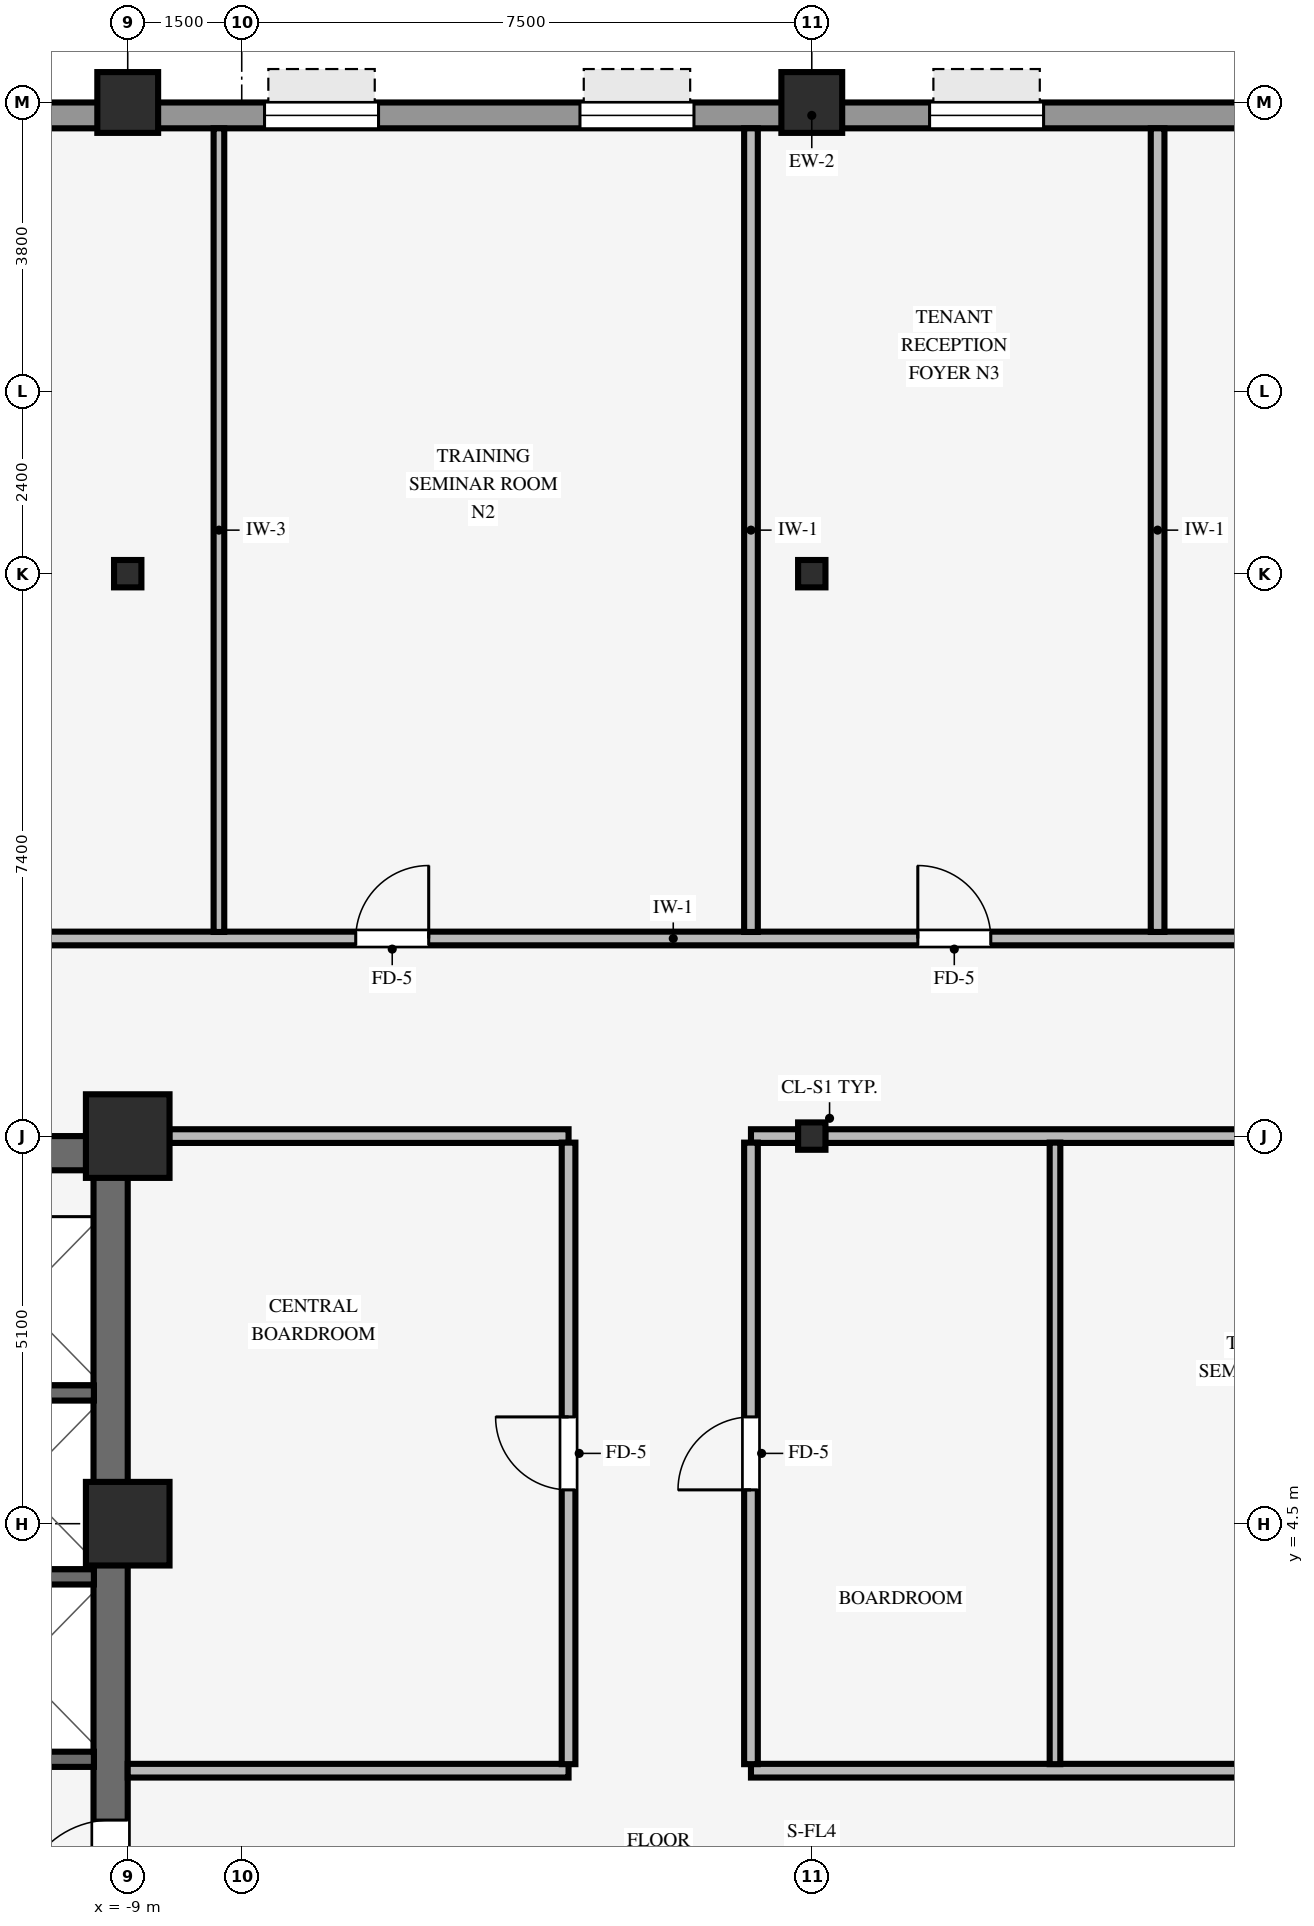
"""IFC4 building model, lengths in metres.
Left out: names, types, materials, properties, quantities, classifications, styles, units other than length and angle.
Written with IfcOpenShell. Run it as: python <this file> out.ifc"""

import sys

from ifc_helpers import new_model, si_unit, direction, frame, frame_2d, origin, origin_2d, place, context, subcontext, project, spatial, rectangle, hollow_rectangle, i_section, extrude, source, transform, mapped, element, fill, save


model = new_model("IFC4")
c1 = context("Model", 3, precision=1e-05, world=origin(), true_north=direction((0.0, 1.0)))
c2 = subcontext(c1, "Body", "Model", "MODEL_VIEW")
j1 = project(units=[si_unit("LENGTHUNIT", "METRE"), si_unit("PLANEANGLEUNIT", "RADIAN")], contexts=[c1])
p1 = place(None, origin())
s1 = spatial("IfcSite", under=j1, at=p1, CompositionType="ELEMENT")
p2 = place(p1, origin())
s2 = spatial("IfcBuilding", under=s1, at=p2, CompositionType="ELEMENT")
p3 = place(p2, frame((0.0, 0.0, 82.35)))
s3 = spatial("IfcBuildingStorey", under=s2, at=p3, CompositionType="ELEMENT", Elevation=82.35)
p4 = place(p3, frame((-17.5, 9.375, 0.0), z_axis=(0.0, 0.0, 1.0), x_axis=(1.0, 0.0, 0.0)))
e1 = element("IfcWall", 1, at=p4, inside=s3, PredefinedType="SHEAR", context=c2, shape_type="SweptSolid", body=[
    extrude(rectangle(XDim=8.5, YDim=0.45, at=frame_2d((4.25, 0.0))), origin(), (0.0, 0.0, 1.0), 3.25),
])
p5 = place(p3, frame((-9.225, -9.155, 0.0), z_axis=(0.0, 0.0, 1.0), x_axis=(0.0, 1.0, 0.0)))
e2 = element("IfcWall", 2, at=p5, inside=s3, PredefinedType="SHEAR", context=c2, shape_type="SweptSolid", body=[
    extrude(rectangle(XDim=18.31, YDim=0.45, at=frame_2d((9.155, 0.0))), origin(), (0.0, 0.0, 1.0), 3.25),
])
p6 = place(p5, frame((8.555, 0.0, 0.0)))
e3 = element("IfcOpeningElement", 3, at=p6, cuts=e2, PredefinedType="OPENING", context=c2, shape_type="SweptSolid", body=[
    extrude(rectangle(XDim=1.2, YDim=2.15, at=frame_2d((0.6, 1.075))), frame((0.0, 0.235, 0.0), z_axis=(0.0, -1.0, 0.0), x_axis=(1.0, 0.0, 0.0)), (0.0, 0.0, 1.0), 0.47),
])
for number, where, z_axis, x_axis in (
    (4, (-9.0, 4.5, 0.0), (0.0, 0.0, 1.0), (1.0, 0.0, 0.0)),
    (5, (-9.0, 9.6, 0.0), (0.0, 0.0, 1.0), (1.0, 0.0, 0.0)),
):
    element("IfcColumn", number, at=place(p3, frame(where, z_axis=z_axis, x_axis=x_axis)), inside=s3, PredefinedType="COLUMN", context=c2, shape_type="SweptSolid", body=[
        extrude(rectangle(XDim=1.1, YDim=1.1, at=origin_2d()), origin(), (0.0, 0.0, 1.0), 3.25),
    ])
for number, where, z_axis, x_axis in (
    (6, (-9.0, 23.2, 0.0), (0.0, 0.0, 1.0), (1.0, 0.0, 0.0)),
    (7, (0.0, 23.2, 0.0), (0.0, 0.0, 1.0), (1.0, 0.0, 0.0)),
):
    element("IfcColumn", number, at=place(p3, frame(where, z_axis=z_axis, x_axis=x_axis)), inside=s3, PredefinedType="COLUMN", context=c2, shape_type="SweptSolid", body=[
        extrude(hollow_rectangle(XDim=0.8, YDim=0.8, WallThickness=0.055, InnerFilletRadius=0.055, OuterFilletRadius=0.11, at=origin_2d()), origin(), (0.0, 0.0, 1.0), 3.25),
    ])
for number, where, z_axis, x_axis in (
    (8, (0.0, 9.6, 0.0), (0.0, 0.0, 1.0), (1.0, 0.0, 0.0)),
    (9, (0.0, 17.0, 0.0), (0.0, 0.0, 1.0), (1.0, 0.0, 0.0)),
    (10, (-9.0, 17.0, 0.0), (0.0, 0.0, 1.0), (1.0, 0.0, 0.0)),
):
    element("IfcColumn", number, at=place(p3, frame(where, z_axis=z_axis, x_axis=x_axis)), inside=s3, PredefinedType="COLUMN", context=c2, shape_type="SweptSolid", body=[
        extrude(i_section(OverallWidth=0.36, OverallDepth=0.36, WebThickness=0.021, FlangeThickness=0.021, FilletRadius=0.018, at=origin_2d()), origin(), (0.0, 0.0, 1.0), 3.25),
    ])
p7 = place(p3, frame((-19.4, 23.03, 0.0), z_axis=(0.0, 0.0, 1.0), x_axis=(1.0, 0.0, 0.0)))
e11 = element("IfcWall", 11, at=p7, inside=s3, PredefinedType="STANDARD", context=c2, shape_type="SweptSolid", body=[
    extrude(rectangle(XDim=38.8, YDim=0.34, at=frame_2d((19.4, 0.0))), origin(), (0.0, 0.0, 1.0), 2.585),
])
p8 = place(p7, frame((2.55, 0.0, 0.8)))
e12 = element("IfcOpeningElement", 12, at=p8, cuts=e11, PredefinedType="OPENING", context=c2, shape_type="SweptSolid", body=[
    extrude(rectangle(XDim=1.5, YDim=1.6, at=frame_2d((0.75, 0.8))), frame((0.0, 0.18, 0.0), z_axis=(0.0, -1.0, 0.0), x_axis=(1.0, 0.0, 0.0)), (0.0, 0.0, 1.0), 0.36),
])
p9 = place(p7, frame((7.15, 0.0, 0.8)))
e13 = element("IfcOpeningElement", 13, at=p9, cuts=e11, PredefinedType="OPENING", context=c2, shape_type="SweptSolid", body=[
    extrude(rectangle(XDim=1.5, YDim=1.6, at=frame_2d((0.75, 0.8))), frame((0.0, 0.18, 0.0), z_axis=(0.0, -1.0, 0.0), x_axis=(1.0, 0.0, 0.0)), (0.0, 0.0, 1.0), 0.36),
])
p10 = place(p7, frame((12.2, 0.0, 0.8)))
e14 = element("IfcOpeningElement", 14, at=p10, cuts=e11, PredefinedType="OPENING", context=c2, shape_type="SweptSolid", body=[
    extrude(rectangle(XDim=1.5, YDim=1.6, at=frame_2d((0.75, 0.8))), frame((0.0, 0.18, 0.0), z_axis=(0.0, -1.0, 0.0), x_axis=(1.0, 0.0, 0.0)), (0.0, 0.0, 1.0), 0.36),
])
p11 = place(p7, frame((16.35, 0.0, 0.8)))
e15 = element("IfcOpeningElement", 15, at=p11, cuts=e11, PredefinedType="OPENING", context=c2, shape_type="SweptSolid", body=[
    extrude(rectangle(XDim=1.5, YDim=1.6, at=frame_2d((0.75, 0.8))), frame((0.0, 0.18, 0.0), z_axis=(0.0, -1.0, 0.0), x_axis=(1.0, 0.0, 0.0)), (0.0, 0.0, 1.0), 0.36),
])
p12 = place(p7, frame((20.95, 0.0, 0.8)))
e16 = element("IfcOpeningElement", 16, at=p12, cuts=e11, PredefinedType="OPENING", context=c2, shape_type="SweptSolid", body=[
    extrude(rectangle(XDim=1.5, YDim=1.6, at=frame_2d((0.75, 0.8))), frame((0.0, 0.18, 0.0), z_axis=(0.0, -1.0, 0.0), x_axis=(1.0, 0.0, 0.0)), (0.0, 0.0, 1.0), 0.36),
])
p13 = place(p7, frame((25.55, 0.0, 0.8)))
e17 = element("IfcOpeningElement", 17, at=p13, cuts=e11, PredefinedType="OPENING", context=c2, shape_type="SweptSolid", body=[
    extrude(rectangle(XDim=1.5, YDim=1.6, at=frame_2d((0.75, 0.8))), frame((0.0, 0.18, 0.0), z_axis=(0.0, -1.0, 0.0), x_axis=(1.0, 0.0, 0.0)), (0.0, 0.0, 1.0), 0.36),
])
p14 = place(p7, frame((30.15, 0.0, 0.8)))
e18 = element("IfcOpeningElement", 18, at=p14, cuts=e11, PredefinedType="OPENING", context=c2, shape_type="SweptSolid", body=[
    extrude(rectangle(XDim=1.5, YDim=1.6, at=frame_2d((0.75, 0.8))), frame((0.0, 0.18, 0.0), z_axis=(0.0, -1.0, 0.0), x_axis=(1.0, 0.0, 0.0)), (0.0, 0.0, 1.0), 0.36),
])
p15 = place(p7, frame((34.75, 0.0, 0.8)))
e19 = element("IfcOpeningElement", 19, at=p15, cuts=e11, PredefinedType="OPENING", context=c2, shape_type="SweptSolid", body=[
    extrude(rectangle(XDim=1.5, YDim=1.6, at=frame_2d((0.75, 0.8))), frame((0.0, 0.18, 0.0), z_axis=(0.0, -1.0, 0.0), x_axis=(1.0, 0.0, 0.0)), (0.0, 0.0, 1.0), 0.36),
])
for number, where, z_axis, x_axis in (
    (20, (-11.505, 1.4, 0.0), (0.0, 0.0, 1.0), (1.0, 0.0, 0.0)),
    (21, (-11.505, 3.8, 0.0), (0.0, 0.0, 1.0), (1.0, 0.0, 0.0)),
    (22, (-11.505, 6.22, 0.0), (0.0, 0.0, 1.0), (1.0, 0.0, 0.0)),
):
    element("IfcWall", number, at=place(p3, frame(where, z_axis=z_axis, x_axis=x_axis)), inside=s3, PredefinedType="SHEAR", context=c2, shape_type="SweptSolid", body=[
        extrude(rectangle(XDim=2.06, YDim=0.2, at=frame_2d((1.03, 0.0))), origin(), (0.0, 0.0, 1.0), 3.25),
    ])
p16 = place(p3, frame((-9.0, 1.25, 0.0), z_axis=(0.0, 0.0, 1.0), x_axis=(1.0, 0.0, 0.0)))
e23 = element("IfcWall", 23, at=p16, inside=s3, PredefinedType="PARTITIONING", context=c2, shape_type="SweptSolid", body=[
    extrude(rectangle(XDim=5.8, YDim=0.18, at=frame_2d((2.9, 0.0))), origin(), (0.0, 0.0, 1.0), 3.24),
])
p17 = place(p3, frame((-0.8, 1.25, 0.0), z_axis=(0.0, 0.0, 1.0), x_axis=(1.0, 0.0, 0.0)))
e24 = element("IfcWall", 24, at=p17, inside=s3, PredefinedType="PARTITIONING", context=c2, shape_type="SweptSolid", body=[
    extrude(rectangle(XDim=9.8, YDim=0.18, at=frame_2d((4.9, 0.0))), origin(), (0.0, 0.0, 1.0), 3.24),
])
p18 = place(p17, frame((6.42, 0.0, 0.0)))
e25 = element("IfcOpeningElement", 25, at=p18, cuts=e24, PredefinedType="OPENING", context=c2, shape_type="SweptSolid", body=[
    extrude(rectangle(XDim=0.96, YDim=2.1, at=frame_2d((0.48, 1.05))), frame((0.0, 0.1, 0.0), z_axis=(0.0, -1.0, 0.0), x_axis=(1.0, 0.0, 0.0)), (0.0, 0.0, 1.0), 0.2),
])
p19 = place(p3, frame((-8.454, 9.6, 0.0), z_axis=(0.0, 0.0, 1.0), x_axis=(1.0, 0.0, 0.0)))
e26 = element("IfcWall", 26, at=p19, inside=s3, PredefinedType="PARTITIONING", context=c2, shape_type="SweptSolid", body=[
    extrude(rectangle(XDim=5.254, YDim=0.18, at=frame_2d((2.627, 0.0))), origin(), (0.0, 0.0, 1.0), 2.285),
])
p20 = place(p3, frame((-0.8, 9.6, 0.0), z_axis=(0.0, 0.0, 1.0), x_axis=(1.0, 0.0, 0.0)))
e27 = element("IfcWall", 27, at=p20, inside=s3, PredefinedType="PARTITIONING", context=c2, shape_type="SweptSolid", body=[
    extrude(rectangle(XDim=0.624, YDim=0.18, at=frame_2d((0.312, 0.0))), origin(), (0.0, 0.0, 1.0), 2.285),
])
p21 = place(p3, frame((0.176, 9.6, 0.0), z_axis=(0.0, 0.0, 1.0), x_axis=(1.0, 0.0, 0.0)))
e28 = element("IfcWall", 28, at=p21, inside=s3, PredefinedType="PARTITIONING", context=c2, shape_type="SweptSolid", body=[
    extrude(rectangle(XDim=8.278, YDim=0.18, at=frame_2d((4.139, 0.0))), origin(), (0.0, 0.0, 1.0), 2.285),
])
p22 = place(p3, frame((-15.0, 12.2, 0.0), z_axis=(0.0, 0.0, 1.0), x_axis=(1.0, 0.0, 0.0)))
e29 = element("IfcWall", 29, at=p22, inside=s3, PredefinedType="PARTITIONING", context=c2, shape_type="SweptSolid", body=[
    extrude(rectangle(XDim=30.0, YDim=0.18, at=frame_2d((15.0, 0.0))), origin(), (0.0, 0.0, 1.0), 3.24),
])
p23 = place(p22, frame((3.1, 0.0, 0.0)))
e30 = element("IfcOpeningElement", 30, at=p23, cuts=e29, PredefinedType="OPENING", context=c2, shape_type="SweptSolid", body=[
    extrude(rectangle(XDim=0.96, YDim=2.1, at=frame_2d((0.48, 1.05))), frame((0.0, 0.1, 0.0), z_axis=(0.0, -1.0, 0.0), x_axis=(1.0, 0.0, 0.0)), (0.0, 0.0, 1.0), 0.2),
])
p24 = place(p22, frame((16.395, 0.0, 0.0)))
e31 = element("IfcOpeningElement", 31, at=p24, cuts=e29, PredefinedType="OPENING", context=c2, shape_type="SweptSolid", body=[
    extrude(rectangle(XDim=0.96, YDim=2.1, at=frame_2d((0.48, 1.05))), frame((0.0, 0.1, 0.0), z_axis=(0.0, -1.0, 0.0), x_axis=(1.0, 0.0, 0.0)), (0.0, 0.0, 1.0), 0.2),
])
p25 = place(p22, frame((21.62, 0.0, 0.0)))
e32 = element("IfcOpeningElement", 32, at=p25, cuts=e29, PredefinedType="OPENING", context=c2, shape_type="SweptSolid", body=[
    extrude(rectangle(XDim=0.96, YDim=2.1, at=frame_2d((0.48, 1.05))), frame((0.0, 0.1, 0.0), z_axis=(0.0, -1.0, 0.0), x_axis=(1.0, 0.0, 0.0)), (0.0, 0.0, 1.0), 0.2),
])
p26 = place(p22, frame((9.0, 0.0, 0.0)))
e33 = element("IfcOpeningElement", 33, at=p26, cuts=e29, PredefinedType="OPENING", context=c2, shape_type="SweptSolid", body=[
    extrude(rectangle(XDim=0.96, YDim=2.1, at=frame_2d((0.48, 1.05))), frame((0.0, 0.1, 0.0), z_axis=(0.0, -1.0, 0.0), x_axis=(1.0, 0.0, 0.0)), (0.0, 0.0, 1.0), 0.2),
])
p27 = place(p22, frame((26.08, 0.0, 0.0)))
e34 = element("IfcOpeningElement", 34, at=p27, cuts=e29, PredefinedType="OPENING", context=c2, shape_type="SweptSolid", body=[
    extrude(rectangle(XDim=0.96, YDim=2.1, at=frame_2d((0.48, 1.05))), frame((0.0, 0.1, 0.0), z_axis=(0.0, -1.0, 0.0), x_axis=(1.0, 0.0, 0.0)), (0.0, 0.0, 1.0), 0.2),
])
p28 = place(p3, frame((-7.8, 12.286, 0.0), z_axis=(0.0, 0.0, 1.0), x_axis=(0.0, 1.0, 0.0)))
e35 = element("IfcWall", 35, at=p28, inside=s3, PredefinedType="PARTITIONING", context=c2, shape_type="SweptSolid", body=[
    extrude(rectangle(XDim=10.574, YDim=0.14, at=frame_2d((5.287, 0.0))), origin(), (0.0, 0.0, 1.0), 3.24),
])
p29 = place(p3, frame((-3.2, 1.336, 0.0), z_axis=(0.0, 0.0, 1.0), x_axis=(0.0, 1.0, 0.0)))
e36 = element("IfcWall", 36, at=p29, inside=s3, PredefinedType="PARTITIONING", context=c2, shape_type="SweptSolid", body=[
    extrude(rectangle(XDim=8.178, YDim=0.18, at=frame_2d((4.089, 0.0))), origin(), (0.0, 0.0, 1.0), 3.24),
])
p30 = place(p29, frame((3.609, 0.0, 0.0)))
e37 = element("IfcOpeningElement", 37, at=p30, cuts=e36, PredefinedType="OPENING", context=c2, shape_type="SweptSolid", body=[
    extrude(rectangle(XDim=0.96, YDim=2.1, at=frame_2d((0.48, 1.05))), frame((0.0, 0.1, 0.0), z_axis=(0.0, -1.0, 0.0), x_axis=(1.0, 0.0, 0.0)), (0.0, 0.0, 1.0), 0.2),
])
p31 = place(p3, frame((-0.8, 1.336, 0.0), z_axis=(0.0, 0.0, 1.0), x_axis=(0.0, 1.0, 0.0)))
e38 = element("IfcWall", 38, at=p31, inside=s3, PredefinedType="PARTITIONING", context=c2, shape_type="SweptSolid", body=[
    extrude(rectangle(XDim=8.178, YDim=0.18, at=frame_2d((4.089, 0.0))), origin(), (0.0, 0.0, 1.0), 3.24),
])
p32 = place(p31, frame((3.609, 0.0, 0.0)))
e39 = element("IfcOpeningElement", 39, at=p32, cuts=e38, PredefinedType="OPENING", context=c2, shape_type="SweptSolid", body=[
    extrude(rectangle(XDim=0.96, YDim=2.1, at=frame_2d((0.48, 1.05))), frame((0.0, 0.1, 0.0), z_axis=(0.0, -1.0, 0.0), x_axis=(1.0, 0.0, 0.0)), (0.0, 0.0, 1.0), 0.2),
])
p33 = place(p3, frame((-0.8, 12.286, 0.0), z_axis=(0.0, 0.0, 1.0), x_axis=(0.0, 1.0, 0.0)))
e40 = element("IfcWall", 40, at=p33, inside=s3, PredefinedType="PARTITIONING", context=c2, shape_type="SweptSolid", body=[
    extrude(rectangle(XDim=10.574, YDim=0.18, at=frame_2d((5.287, 0.0))), origin(), (0.0, 0.0, 1.0), 3.24),
])
p34 = place(p3, frame((3.2, 1.336, 0.0), z_axis=(0.0, 0.0, 1.0), x_axis=(0.0, 1.0, 0.0)))
e41 = element("IfcWall", 41, at=p34, inside=s3, PredefinedType="PARTITIONING", context=c2, shape_type="SweptSolid", body=[
    extrude(rectangle(XDim=8.178, YDim=0.14, at=frame_2d((4.089, 0.0))), origin(), (0.0, 0.0, 1.0), 3.24),
])
p35 = place(p3, frame((4.55, 12.286, 0.0), z_axis=(0.0, 0.0, 1.0), x_axis=(0.0, 1.0, 0.0)))
e42 = element("IfcWall", 42, at=p35, inside=s3, PredefinedType="PARTITIONING", context=c2, shape_type="SweptSolid", body=[
    extrude(rectangle(XDim=10.574, YDim=0.18, at=frame_2d((5.287, 0.0))), origin(), (0.0, 0.0, 1.0), 3.24),
])
m1 = source(origin(), c2, "Body", "SweptSolid", [
    extrude(rectangle(XDim=1.5, YDim=1.6, at=frame_2d((0.75, 0.8))), frame((0.0, 0.03, 0.0), z_axis=(0.0, -1.0, 0.0), x_axis=(1.0, 0.0, 0.0)), (0.0, 0.0, 1.0), 0.06),
])
p36 = place(p10, origin())
e43 = element("IfcWindow", 43, at=p36, inside=s3, PartitioningType="SINGLE_PANEL", PredefinedType="WINDOW", context=c2, shape_type="MappedRepresentation", body=[
    mapped(m1, transform((0.0, 0.0, 0.0), scale=1.0)),
])
fill(e14, e43)
p37 = place(p11, origin())
e44 = element("IfcWindow", 44, at=p37, inside=s3, PartitioningType="SINGLE_PANEL", PredefinedType="WINDOW", context=c2, shape_type="MappedRepresentation", body=[
    mapped(m1, transform((0.0, 0.0, 0.0), scale=1.0)),
])
fill(e15, e44)
p38 = place(p12, origin())
e45 = element("IfcWindow", 45, at=p38, inside=s3, PartitioningType="SINGLE_PANEL", PredefinedType="WINDOW", context=c2, shape_type="MappedRepresentation", body=[
    mapped(m1, transform((0.0, 0.0, 0.0), scale=1.0)),
])
fill(e16, e45)
m2 = source(origin(), c2, "Body", "SweptSolid", [
    extrude(rectangle(XDim=1.2, YDim=2.15, at=frame_2d((0.6, 1.075))), frame((0.0, 0.025, 0.0), z_axis=(0.0, -1.0, 0.0), x_axis=(1.0, 0.0, 0.0)), (0.0, 0.0, 1.0), 0.05),
])
p39 = place(p6, origin())
e46 = element("IfcDoor", 46, at=p39, inside=s3, OperationType="SINGLE_SWING_LEFT", PredefinedType="DOOR", context=c2, shape_type="MappedRepresentation", body=[
    mapped(m2, transform((0.0, 0.0, 0.0), scale=1.0)),
])
fill(e3, e46)
m3 = source(origin(), c2, "Body", "SweptSolid", [
    extrude(rectangle(XDim=0.96, YDim=2.1, at=frame_2d((0.48, 1.05))), frame((0.0, 0.025, 0.0), z_axis=(0.0, -1.0, 0.0), x_axis=(1.0, 0.0, 0.0)), (0.0, 0.0, 1.0), 0.05),
])
p40 = place(p30, origin())
e47 = element("IfcDoor", 47, at=p40, inside=s3, OperationType="SINGLE_SWING_RIGHT", PredefinedType="DOOR", context=c2, shape_type="MappedRepresentation", body=[
    mapped(m3, transform((0.0, 0.0, 0.0), scale=1.0)),
])
fill(e37, e47)
p41 = place(p32, origin())
e48 = element("IfcDoor", 48, at=p41, inside=s3, OperationType="SINGLE_SWING_LEFT", PredefinedType="DOOR", context=c2, shape_type="MappedRepresentation", body=[
    mapped(m3, transform((0.0, 0.0, 0.0), scale=1.0)),
])
fill(e39, e48)
p42 = place(p24, origin())
e49 = element("IfcDoor", 49, at=p42, inside=s3, OperationType="SINGLE_SWING_LEFT", PredefinedType="DOOR", context=c2, shape_type="MappedRepresentation", body=[
    mapped(m3, transform((0.0, 0.0, 0.0), scale=1.0)),
])
fill(e31, e49)
p43 = place(p26, origin())
e50 = element("IfcDoor", 50, at=p43, inside=s3, OperationType="SINGLE_SWING_RIGHT", PredefinedType="DOOR", context=c2, shape_type="MappedRepresentation", body=[
    mapped(m3, transform((0.0, 0.0, 0.0), scale=1.0)),
])
fill(e33, e50)
save(model, sys.argv[1])
